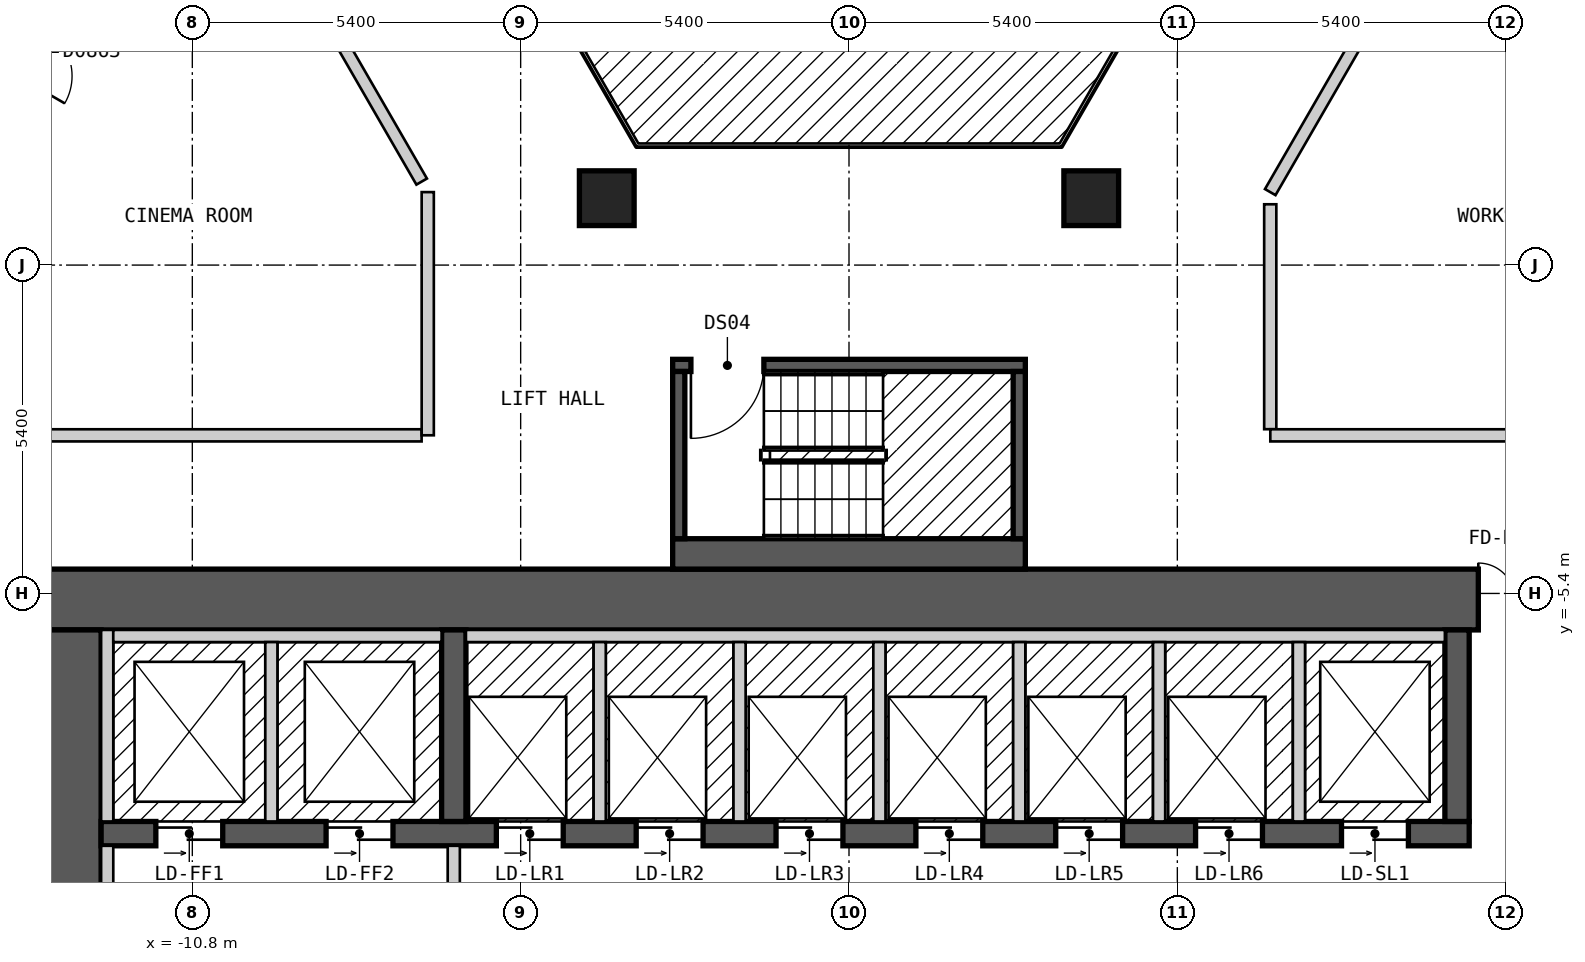
"""IFC4 building model, lengths in metres.
Left out: names, types, materials, properties, quantities, classifications, styles, units other than length and angle.
Written with IfcOpenShell. Run it as: python <this file> out.ifc"""

import sys

from ifc_helpers import new_model, si_unit, direction, frame, frame_2d, origin, origin_2d, place, context, subcontext, project, spatial, rectangle, extrude, element, fill, save


model = new_model("IFC4")
c1 = context("Model", 3, precision=1e-05, world=origin(), true_north=direction((0.0, 1.0)))
c2 = subcontext(c1, "Body", "Model", "MODEL_VIEW")
j1 = project(units=[si_unit("LENGTHUNIT", "METRE"), si_unit("PLANEANGLEUNIT", "RADIAN")], contexts=[c1])
p1 = place(None, origin())
s1 = spatial("IfcSite", under=j1, at=p1, CompositionType="ELEMENT")
p2 = place(p1, origin())
s2 = spatial("IfcBuilding", under=s1, at=p2, CompositionType="ELEMENT")
p3 = place(p2, frame((0.0, 0.0, 72.0)))
s3 = spatial("IfcBuildingStorey", under=s2, at=p3, CompositionType="ELEMENT", Elevation=72.0)
for number, where, z_axis, x_axis in (
    (1, (3.984, 1.1, 0.0), (0.0, 0.0, 1.0), (1.0, 0.0, 0.0)),
    (2, (-3.984, 1.1, 0.0), (0.0, 0.0, 1.0), (1.0, 0.0, 0.0)),
):
    element("IfcColumn", number, at=place(p3, frame(where, z_axis=z_axis, x_axis=x_axis)), inside=s3, PredefinedType="COLUMN", context=c2, shape_type="SweptSolid", body=[
        extrude(rectangle(XDim=0.9, YDim=0.9, at=origin_2d()), origin(), (0.0, 0.0, 1.0), 3.0),
    ])
p4 = place(p3, frame((-13.3, -5.5, 0.0), z_axis=(0.0, 0.0, 1.0), x_axis=(1.0, 0.0, 0.0)))
e3 = element("IfcWall", 3, at=p4, inside=s3, PredefinedType="SHEAR", context=c2, shape_type="SweptSolid", body=[
    extrude(rectangle(XDim=26.6, YDim=1.0, at=frame_2d((13.3, 0.0))), origin(), (0.0, 0.0, 1.0), 2.7),
])
p5 = place(p4, frame((23.65, 0.0, 0.0)))
e4 = element("IfcOpeningElement", 4, at=p5, cuts=e3, PredefinedType="OPENING", context=c2, shape_type="SweptSolid", body=[
    extrude(rectangle(XDim=1.2, YDim=2.1, at=frame_2d((0.6, 1.05))), frame((0.0, 0.51, 0.0), z_axis=(0.0, -1.0, 0.0), x_axis=(1.0, 0.0, 0.0)), (0.0, 0.0, 1.0), 1.02),
])
p6 = place(p3, frame((-12.8, -18.0, 0.0), z_axis=(0.0, 0.0, 1.0), x_axis=(0.0, 1.0, 0.0)))
e5 = element("IfcWall", 5, at=p6, inside=s3, PredefinedType="SHEAR", context=c2, shape_type="SweptSolid", body=[
    extrude(rectangle(XDim=12.0, YDim=1.0, at=frame_2d((6.0, 0.0))), origin(), (0.0, 0.0, 1.0), 2.7),
])
p7 = place(p6, frame((3.8, 0.0, 0.0)))
e6 = element("IfcOpeningElement", 6, at=p7, cuts=e5, PredefinedType="OPENING", context=c2, shape_type="SweptSolid", body=[
    extrude(rectangle(XDim=1.2, YDim=2.1, at=frame_2d((0.6, 1.05))), frame((0.0, 0.51, 0.0), z_axis=(0.0, -1.0, 0.0), x_axis=(1.0, 0.0, 0.0)), (0.0, 0.0, 1.0), 1.02),
])
p8 = place(p3, frame((-12.3, -9.35, 0.0), z_axis=(0.0, 0.0, 1.0), x_axis=(1.0, 0.0, 0.0)))
e7 = element("IfcWall", 7, at=p8, inside=s3, PredefinedType="SHEAR", context=c2, shape_type="SweptSolid", body=[
    extrude(rectangle(XDim=22.5, YDim=0.4, at=frame_2d((11.25, 0.0))), origin(), (0.0, 0.0, 1.0), 2.7),
])
p9 = place(p8, frame((0.9, 0.0, 0.0)))
e8 = element("IfcOpeningElement", 8, at=p9, cuts=e7, PredefinedType="OPENING", context=c2, shape_type="SweptSolid", body=[
    extrude(rectangle(XDim=1.1, YDim=2.1, at=frame_2d((0.55, 1.05))), frame((0.0, 0.21, 0.0), z_axis=(0.0, -1.0, 0.0), x_axis=(1.0, 0.0, 0.0)), (0.0, 0.0, 1.0), 0.42),
])
p10 = place(p8, frame((3.7, 0.0, 0.0)))
e9 = element("IfcOpeningElement", 9, at=p10, cuts=e7, PredefinedType="OPENING", context=c2, shape_type="SweptSolid", body=[
    extrude(rectangle(XDim=1.1, YDim=2.1, at=frame_2d((0.55, 1.05))), frame((0.0, 0.21, 0.0), z_axis=(0.0, -1.0, 0.0), x_axis=(1.0, 0.0, 0.0)), (0.0, 0.0, 1.0), 0.42),
])
p11 = place(p8, frame((6.5, 0.0, 0.0)))
e10 = element("IfcOpeningElement", 10, at=p11, cuts=e7, PredefinedType="OPENING", context=c2, shape_type="SweptSolid", body=[
    extrude(rectangle(XDim=1.1, YDim=2.1, at=frame_2d((0.55, 1.05))), frame((0.0, 0.21, 0.0), z_axis=(0.0, -1.0, 0.0), x_axis=(1.0, 0.0, 0.0)), (0.0, 0.0, 1.0), 0.42),
])
p12 = place(p8, frame((8.8, 0.0, 0.0)))
e11 = element("IfcOpeningElement", 11, at=p12, cuts=e7, PredefinedType="OPENING", context=c2, shape_type="SweptSolid", body=[
    extrude(rectangle(XDim=1.1, YDim=2.1, at=frame_2d((0.55, 1.05))), frame((0.0, 0.21, 0.0), z_axis=(0.0, -1.0, 0.0), x_axis=(1.0, 0.0, 0.0)), (0.0, 0.0, 1.0), 0.42),
])
p13 = place(p8, frame((11.1, 0.0, 0.0)))
e12 = element("IfcOpeningElement", 12, at=p13, cuts=e7, PredefinedType="OPENING", context=c2, shape_type="SweptSolid", body=[
    extrude(rectangle(XDim=1.1, YDim=2.1, at=frame_2d((0.55, 1.05))), frame((0.0, 0.21, 0.0), z_axis=(0.0, -1.0, 0.0), x_axis=(1.0, 0.0, 0.0)), (0.0, 0.0, 1.0), 0.42),
])
p14 = place(p8, frame((13.4, 0.0, 0.0)))
e13 = element("IfcOpeningElement", 13, at=p14, cuts=e7, PredefinedType="OPENING", context=c2, shape_type="SweptSolid", body=[
    extrude(rectangle(XDim=1.1, YDim=2.1, at=frame_2d((0.55, 1.05))), frame((0.0, 0.21, 0.0), z_axis=(0.0, -1.0, 0.0), x_axis=(1.0, 0.0, 0.0)), (0.0, 0.0, 1.0), 0.42),
])
p15 = place(p8, frame((15.7, 0.0, 0.0)))
e14 = element("IfcOpeningElement", 14, at=p15, cuts=e7, PredefinedType="OPENING", context=c2, shape_type="SweptSolid", body=[
    extrude(rectangle(XDim=1.1, YDim=2.1, at=frame_2d((0.55, 1.05))), frame((0.0, 0.21, 0.0), z_axis=(0.0, -1.0, 0.0), x_axis=(1.0, 0.0, 0.0)), (0.0, 0.0, 1.0), 0.42),
])
p16 = place(p8, frame((18.0, 0.0, 0.0)))
e15 = element("IfcOpeningElement", 15, at=p16, cuts=e7, PredefinedType="OPENING", context=c2, shape_type="SweptSolid", body=[
    extrude(rectangle(XDim=1.1, YDim=2.1, at=frame_2d((0.55, 1.05))), frame((0.0, 0.21, 0.0), z_axis=(0.0, -1.0, 0.0), x_axis=(1.0, 0.0, 0.0)), (0.0, 0.0, 1.0), 0.42),
])
p17 = place(p8, frame((20.4, 0.0, 0.0)))
e16 = element("IfcOpeningElement", 16, at=p17, cuts=e7, PredefinedType="OPENING", context=c2, shape_type="SweptSolid", body=[
    extrude(rectangle(XDim=1.1, YDim=2.1, at=frame_2d((0.55, 1.05))), frame((0.0, 0.21, 0.0), z_axis=(0.0, -1.0, 0.0), x_axis=(1.0, 0.0, 0.0)), (0.0, 0.0, 1.0), 0.42),
])
for number, where, z_axis, x_axis in (
    (17, (-6.5, -9.15, 0.0), (0.0, 0.0, 1.0), (0.0, 1.0, 0.0)),
    (18, (10.0, -9.15, 0.0), (0.0, 0.0, 1.0), (0.0, 1.0, 0.0)),
):
    element("IfcWall", number, at=place(p3, frame(where, z_axis=z_axis, x_axis=x_axis)), inside=s3, PredefinedType="SHEAR", context=c2, shape_type="SweptSolid", body=[
        extrude(rectangle(XDim=3.15, YDim=0.4, at=frame_2d((1.575, 0.0))), origin(), (0.0, 0.0, 1.0), 2.7),
    ])
p18 = place(p3, frame((-2.9, -4.75, 0.0), z_axis=(0.0, 0.0, 1.0), x_axis=(1.0, 0.0, 0.0)))
e19 = element("IfcWall", 19, at=p18, inside=s3, PredefinedType="SOLIDWALL", context=c2, shape_type="SweptSolid", body=[
    extrude(rectangle(XDim=5.8, YDim=0.5, at=frame_2d((2.9, 0.0))), origin(), (0.0, 0.0, 1.0), 2.7),
])
p19 = place(p3, frame((-2.9, -1.65, 0.0), z_axis=(0.0, 0.0, 1.0), x_axis=(1.0, 0.0, 0.0)))
e20 = element("IfcWall", 20, at=p19, inside=s3, PredefinedType="SOLIDWALL", context=c2, shape_type="SweptSolid", body=[
    extrude(rectangle(XDim=5.8, YDim=0.2, at=frame_2d((2.9, 0.0))), origin(), (0.0, 0.0, 1.0), 2.7),
])
p20 = place(p19, frame((0.3, 0.0, 0.0)))
e21 = element("IfcOpeningElement", 21, at=p20, cuts=e20, PredefinedType="OPENING", context=c2, shape_type="SweptSolid", body=[
    extrude(rectangle(XDim=1.2, YDim=2.1, at=frame_2d((0.6, 1.05))), frame((0.0, 0.11, 0.0), z_axis=(0.0, -1.0, 0.0), x_axis=(1.0, 0.0, 0.0)), (0.0, 0.0, 1.0), 0.22),
])
for number, where, z_axis, x_axis in (
    (22, (-2.8, -4.5, 0.0), (0.0, 0.0, 1.0), (0.0, 1.0, 0.0)),
    (23, (2.8, -4.5, 0.0), (0.0, 0.0, 1.0), (0.0, 1.0, 0.0)),
):
    element("IfcWall", number, at=place(p3, frame(where, z_axis=z_axis, x_axis=x_axis)), inside=s3, PredefinedType="SOLIDWALL", context=c2, shape_type="SweptSolid", body=[
        extrude(rectangle(XDim=2.75, YDim=0.2, at=frame_2d((1.375, 0.0))), origin(), (0.0, 0.0, 1.0), 2.7),
    ])
p21 = place(p3, frame((-10.796, 7.899, 0.0), z_axis=(0.0, 0.0, 1.0), x_axis=(0.500010383074, -0.866019409031, 0.0)))
e24 = element("IfcWall", 24, at=p21, inside=s3, PredefinedType="PARTITIONING", context=c2, shape_type="SweptSolid", body=[
    extrude(rectangle(XDim=7.535, YDim=0.2, at=frame_2d((3.768, 0.0))), origin(), (0.0, 0.0, 1.0), 2.7),
])
p22 = place(p3, frame((8.488, 16.5, 0.0), z_axis=(0.0, 0.0, 1.0), x_axis=(0.499986836607, -0.86603300354, 0.0)))
e25 = element("IfcWall", 25, at=p22, inside=s3, PredefinedType="PARTITIONING", context=c2, shape_type="SweptSolid", body=[
    extrude(rectangle(XDim=20.09, YDim=0.2, at=frame_2d((10.045, 0.0))), origin(), (0.0, 0.0, 1.0), 2.7),
])
p23 = place(p22, frame((4.523, 0.0, 0.0)))
e26 = element("IfcOpeningElement", 26, at=p23, cuts=e25, PredefinedType="OPENING", context=c2, shape_type="SweptSolid", body=[
    extrude(rectangle(XDim=1.0, YDim=2.1, at=frame_2d((0.5, 1.05))), frame((0.0, 0.11, 0.0), z_axis=(0.0, -1.0, 0.0), x_axis=(1.0, 0.0, 0.0)), (0.0, 0.0, 1.0), 0.22),
])
p24 = place(p3, frame((6.928, 1.0, 0.0), z_axis=(0.0, 0.0, 1.0), x_axis=(0.0, -1.0, 0.0)))
e27 = element("IfcWall", 27, at=p24, inside=s3, PredefinedType="PARTITIONING", context=c2, shape_type="SweptSolid", body=[
    extrude(rectangle(XDim=3.699, YDim=0.2, at=frame_2d((1.85, 0.0))), origin(), (0.0, 0.0, 1.0), 2.7),
])
p25 = place(p3, frame((-15.011, -2.8, 0.0), z_axis=(0.0, 0.0, 1.0), x_axis=(1.0, 0.0, 0.0)))
e28 = element("IfcWall", 28, at=p25, inside=s3, PredefinedType="PARTITIONING", context=c2, shape_type="SweptSolid", body=[
    extrude(rectangle(XDim=7.982, YDim=0.2, at=frame_2d((3.991, 0.0))), origin(), (0.0, 0.0, 1.0), 2.7),
])
p26 = place(p3, frame((6.929, -2.8, 0.0), z_axis=(0.0, 0.0, 1.0), x_axis=(1.0, 0.0, 0.0)))
e29 = element("IfcWall", 29, at=p26, inside=s3, PredefinedType="PARTITIONING", context=c2, shape_type="SweptSolid", body=[
    extrude(rectangle(XDim=7.966, YDim=0.2, at=frame_2d((3.983, 0.0))), origin(), (0.0, 0.0, 1.0), 2.7),
])
p27 = place(p3, frame((6.928, 1.2, 0.0), z_axis=(0.0, 0.0, 1.0), x_axis=(0.500055327065, 0.865993458332, 0.0)))
e30 = element("IfcWall", 30, at=p27, inside=s3, PredefinedType="PARTITIONING", context=c2, shape_type="SweptSolid", body=[
    extrude(rectangle(XDim=7.851, YDim=0.2, at=frame_2d((3.926, 0.0))), origin(), (0.0, 0.0, 1.0), 2.7),
])
p28 = place(p3, frame((-16.05, -1.0, 0.0), z_axis=(0.0, 0.0, 1.0), x_axis=(0.499962449088, 0.866047082728, 0.0)))
e31 = element("IfcWall", 31, at=p28, inside=s3, PredefinedType="PARTITIONING", context=c2, shape_type="SweptSolid", body=[
    extrude(rectangle(XDim=10.391, YDim=0.2, at=frame_2d((5.195, 0.0))), origin(), (0.0, 0.0, 1.0), 2.7),
])
p29 = place(p28, frame((4.745, 0.0, 0.0)))
e32 = element("IfcOpeningElement", 32, at=p29, cuts=e31, PredefinedType="OPENING", context=c2, shape_type="SweptSolid", body=[
    extrude(rectangle(XDim=0.9, YDim=2.1, at=frame_2d((0.45, 1.05))), frame((0.0, 0.11, 0.0), z_axis=(0.0, -1.0, 0.0), x_axis=(1.0, 0.0, 0.0)), (0.0, 0.0, 1.0), 0.22),
])
p30 = place(p3, frame((-18.562, -0.951, 0.0), z_axis=(0.0, 0.0, 1.0), x_axis=(0.499992962407, 0.866029466902, 0.0)))
e33 = element("IfcWall", 33, at=p30, inside=s3, PredefinedType="PARTITIONING", context=c2, shape_type="SweptSolid", body=[
    extrude(rectangle(XDim=20.208, YDim=0.2, at=frame_2d((10.104, 0.0))), origin(), (0.0, 0.0, 1.0), 2.7),
])
p31 = place(p30, frame((14.627, 0.0, 0.0)))
e34 = element("IfcOpeningElement", 34, at=p31, cuts=e33, PredefinedType="OPENING", context=c2, shape_type="SweptSolid", body=[
    extrude(rectangle(XDim=1.0, YDim=2.1, at=frame_2d((0.5, 1.05))), frame((0.0, 0.11, 0.0), z_axis=(0.0, -1.0, 0.0), x_axis=(1.0, 0.0, 0.0)), (0.0, 0.0, 1.0), 0.22),
])
p32 = place(p30, frame((4.581, 0.0, 0.0)))
e35 = element("IfcOpeningElement", 35, at=p32, cuts=e33, PredefinedType="OPENING", context=c2, shape_type="SweptSolid", body=[
    extrude(rectangle(XDim=1.0, YDim=2.1, at=frame_2d((0.5, 1.05))), frame((0.0, 0.11, 0.0), z_axis=(0.0, -1.0, 0.0), x_axis=(1.0, 0.0, 0.0)), (0.0, 0.0, 1.0), 0.22),
])
p33 = place(p3, frame((-6.928, -2.799, 0.0), z_axis=(0.0, 0.0, 1.0), x_axis=(0.0, 1.0, 0.0)))
e36 = element("IfcWall", 36, at=p33, inside=s3, PredefinedType="PARTITIONING", context=c2, shape_type="SweptSolid", body=[
    extrude(rectangle(XDim=3.999, YDim=0.2, at=frame_2d((2.0, 0.0))), origin(), (0.0, 0.0, 1.0), 2.7),
])
p34 = place(p3, frame((-12.2, -13.0, 0.0), z_axis=(0.0, 0.0, 1.0), x_axis=(0.0, 1.0, 0.0)))
e37 = element("IfcWall", 37, at=p34, inside=s3, PredefinedType="PARTITIONING", context=c2, shape_type="SweptSolid", body=[
    extrude(rectangle(XDim=3.45, YDim=0.2, at=frame_2d((1.725, 0.0))), origin(), (0.0, 0.0, 1.0), 2.7),
])
p35 = place(p3, frame((-12.2, -9.15, 0.0), z_axis=(0.0, 0.0, 1.0), x_axis=(0.0, 1.0, 0.0)))
e38 = element("IfcWall", 38, at=p35, inside=s3, PredefinedType="SOLIDWALL", context=c2, shape_type="SweptSolid", body=[
    extrude(rectangle(XDim=3.15, YDim=0.2, at=frame_2d((1.575, 0.0))), origin(), (0.0, 0.0, 1.0), 2.7),
])
p36 = place(p3, frame((-12.1, -6.1, 0.0), z_axis=(0.0, 0.0, 1.0), x_axis=(1.0, 0.0, 0.0)))
e39 = element("IfcWall", 39, at=p36, inside=s3, PredefinedType="SOLIDWALL", context=c2, shape_type="SweptSolid", body=[
    extrude(rectangle(XDim=5.4, YDim=0.2, at=frame_2d((2.7, 0.0))), origin(), (0.0, 0.0, 1.0), 2.7),
])
p37 = place(p3, frame((-9.5, -9.15, 0.0), z_axis=(0.0, 0.0, 1.0), x_axis=(0.0, 1.0, 0.0)))
e40 = element("IfcWall", 40, at=p37, inside=s3, PredefinedType="SOLIDWALL", context=c2, shape_type="SweptSolid", body=[
    extrude(rectangle(XDim=2.95, YDim=0.2, at=frame_2d((1.475, 0.0))), origin(), (0.0, 0.0, 1.0), 2.7),
])
p38 = place(p3, frame((-6.5, -14.45, 0.0), z_axis=(0.0, 0.0, 1.0), x_axis=(0.0, 1.0, 0.0)))
e41 = element("IfcWall", 41, at=p38, inside=s3, PredefinedType="PARTITIONING", context=c2, shape_type="SweptSolid", body=[
    extrude(rectangle(XDim=4.9, YDim=0.2, at=frame_2d((2.45, 0.0))), origin(), (0.0, 0.0, 1.0), 2.7),
])
p39 = place(p38, frame((3.15, 0.0, 0.0), z_axis=(0.0, 0.0, 1.0), x_axis=(-1.0, 0.0, 0.0)))
e42 = element("IfcOpeningElement", 42, at=p39, cuts=e41, PredefinedType="OPENING", context=c2, shape_type="SweptSolid", body=[
    extrude(rectangle(XDim=1.4, YDim=2.1, at=frame_2d((0.7, 1.05))), frame((0.0, 0.11, 0.0), z_axis=(0.0, -1.0, 0.0), x_axis=(1.0, 0.0, 0.0)), (0.0, 0.0, 1.0), 0.22),
])
p40 = place(p3, frame((-6.3, -6.1, 0.0), z_axis=(0.0, 0.0, 1.0), x_axis=(1.0, 0.0, 0.0)))
e43 = element("IfcWall", 43, at=p40, inside=s3, PredefinedType="SOLIDWALL", context=c2, shape_type="SweptSolid", body=[
    extrude(rectangle(XDim=16.1, YDim=0.2, at=frame_2d((8.05, 0.0))), origin(), (0.0, 0.0, 1.0), 2.7),
])
for number, where, z_axis, x_axis in (
    (44, (-4.1, -9.15, 0.0), (0.0, 0.0, 1.0), (0.0, 1.0, 0.0)),
    (45, (-1.8, -9.15, 0.0), (0.0, 0.0, 1.0), (0.0, 1.0, 0.0)),
    (46, (0.5, -9.15, 0.0), (0.0, 0.0, 1.0), (0.0, 1.0, 0.0)),
    (47, (2.8, -9.15, 0.0), (0.0, 0.0, 1.0), (0.0, 1.0, 0.0)),
    (48, (5.1, -9.15, 0.0), (0.0, 0.0, 1.0), (0.0, 1.0, 0.0)),
    (49, (7.4, -9.15, 0.0), (0.0, 0.0, 1.0), (0.0, 1.0, 0.0)),
):
    element("IfcWall", number, at=place(p3, frame(where, z_axis=z_axis, x_axis=x_axis)), inside=s3, PredefinedType="SOLIDWALL", context=c2, shape_type="SweptSolid", body=[
        extrude(rectangle(XDim=2.95, YDim=0.2, at=frame_2d((1.475, 0.0))), origin(), (0.0, 0.0, 1.0), 2.7),
    ])
p41 = place(p20, origin())
e50 = element("IfcDoor", 50, at=p41, inside=s3, OperationType="SINGLE_SWING_LEFT", PredefinedType="DOOR", context=c2, shape_type="SweptSolid", body=[
    extrude(rectangle(XDim=1.2, YDim=2.1, at=frame_2d((0.6, 1.05))), frame((0.0, 0.025, 0.0), z_axis=(0.0, -1.0, 0.0), x_axis=(1.0, 0.0, 0.0)), (0.0, 0.0, 1.0), 0.05),
])
fill(e21, e50)
p42 = place(p9, origin())
e51 = element("IfcDoor", 51, at=p42, inside=s3, OperationType="DOUBLE_DOOR_SLIDING", PredefinedType="DOOR", context=c2, shape_type="SweptSolid", body=[
    extrude(rectangle(XDim=1.1, YDim=2.1, at=frame_2d((0.55, 1.05))), frame((0.0, 0.025, 0.0), z_axis=(0.0, -1.0, 0.0), x_axis=(1.0, 0.0, 0.0)), (0.0, 0.0, 1.0), 0.05),
])
fill(e8, e51)
p43 = place(p10, origin())
e52 = element("IfcDoor", 52, at=p43, inside=s3, OperationType="DOUBLE_DOOR_SLIDING", PredefinedType="DOOR", context=c2, shape_type="SweptSolid", body=[
    extrude(rectangle(XDim=1.1, YDim=2.1, at=frame_2d((0.55, 1.05))), frame((0.0, 0.025, 0.0), z_axis=(0.0, -1.0, 0.0), x_axis=(1.0, 0.0, 0.0)), (0.0, 0.0, 1.0), 0.05),
])
fill(e9, e52)
p44 = place(p11, origin())
e53 = element("IfcDoor", 53, at=p44, inside=s3, OperationType="DOUBLE_DOOR_SLIDING", PredefinedType="DOOR", context=c2, shape_type="SweptSolid", body=[
    extrude(rectangle(XDim=1.1, YDim=2.1, at=frame_2d((0.55, 1.05))), frame((0.0, 0.025, 0.0), z_axis=(0.0, -1.0, 0.0), x_axis=(1.0, 0.0, 0.0)), (0.0, 0.0, 1.0), 0.05),
])
fill(e10, e53)
p45 = place(p12, origin())
e54 = element("IfcDoor", 54, at=p45, inside=s3, OperationType="DOUBLE_DOOR_SLIDING", PredefinedType="DOOR", context=c2, shape_type="SweptSolid", body=[
    extrude(rectangle(XDim=1.1, YDim=2.1, at=frame_2d((0.55, 1.05))), frame((0.0, 0.025, 0.0), z_axis=(0.0, -1.0, 0.0), x_axis=(1.0, 0.0, 0.0)), (0.0, 0.0, 1.0), 0.05),
])
fill(e11, e54)
p46 = place(p13, origin())
e55 = element("IfcDoor", 55, at=p46, inside=s3, OperationType="DOUBLE_DOOR_SLIDING", PredefinedType="DOOR", context=c2, shape_type="SweptSolid", body=[
    extrude(rectangle(XDim=1.1, YDim=2.1, at=frame_2d((0.55, 1.05))), frame((0.0, 0.025, 0.0), z_axis=(0.0, -1.0, 0.0), x_axis=(1.0, 0.0, 0.0)), (0.0, 0.0, 1.0), 0.05),
])
fill(e12, e55)
p47 = place(p14, origin())
e56 = element("IfcDoor", 56, at=p47, inside=s3, OperationType="DOUBLE_DOOR_SLIDING", PredefinedType="DOOR", context=c2, shape_type="SweptSolid", body=[
    extrude(rectangle(XDim=1.1, YDim=2.1, at=frame_2d((0.55, 1.05))), frame((0.0, 0.025, 0.0), z_axis=(0.0, -1.0, 0.0), x_axis=(1.0, 0.0, 0.0)), (0.0, 0.0, 1.0), 0.05),
])
fill(e13, e56)
p48 = place(p15, origin())
e57 = element("IfcDoor", 57, at=p48, inside=s3, OperationType="DOUBLE_DOOR_SLIDING", PredefinedType="DOOR", context=c2, shape_type="SweptSolid", body=[
    extrude(rectangle(XDim=1.1, YDim=2.1, at=frame_2d((0.55, 1.05))), frame((0.0, 0.025, 0.0), z_axis=(0.0, -1.0, 0.0), x_axis=(1.0, 0.0, 0.0)), (0.0, 0.0, 1.0), 0.05),
])
fill(e14, e57)
p49 = place(p16, origin())
e58 = element("IfcDoor", 58, at=p49, inside=s3, OperationType="DOUBLE_DOOR_SLIDING", PredefinedType="DOOR", context=c2, shape_type="SweptSolid", body=[
    extrude(rectangle(XDim=1.1, YDim=2.1, at=frame_2d((0.55, 1.05))), frame((0.0, 0.025, 0.0), z_axis=(0.0, -1.0, 0.0), x_axis=(1.0, 0.0, 0.0)), (0.0, 0.0, 1.0), 0.05),
])
fill(e15, e58)
p50 = place(p17, origin())
e59 = element("IfcDoor", 59, at=p50, inside=s3, OperationType="DOUBLE_DOOR_SLIDING", PredefinedType="DOOR", context=c2, shape_type="SweptSolid", body=[
    extrude(rectangle(XDim=1.1, YDim=2.1, at=frame_2d((0.55, 1.05))), frame((0.0, 0.025, 0.0), z_axis=(0.0, -1.0, 0.0), x_axis=(1.0, 0.0, 0.0)), (0.0, 0.0, 1.0), 0.05),
])
fill(e16, e59)
p51 = place(p5, origin())
e60 = element("IfcDoor", 60, at=p51, inside=s3, OperationType="DOUBLE_DOOR_SINGLE_SWING", PredefinedType="DOOR", context=c2, shape_type="SweptSolid", body=[
    extrude(rectangle(XDim=1.2, YDim=2.1, at=frame_2d((0.6, 1.05))), frame((0.0, 0.025, 0.0), z_axis=(0.0, -1.0, 0.0), x_axis=(1.0, 0.0, 0.0)), (0.0, 0.0, 1.0), 0.05),
])
fill(e4, e60)
save(model, sys.argv[1])
